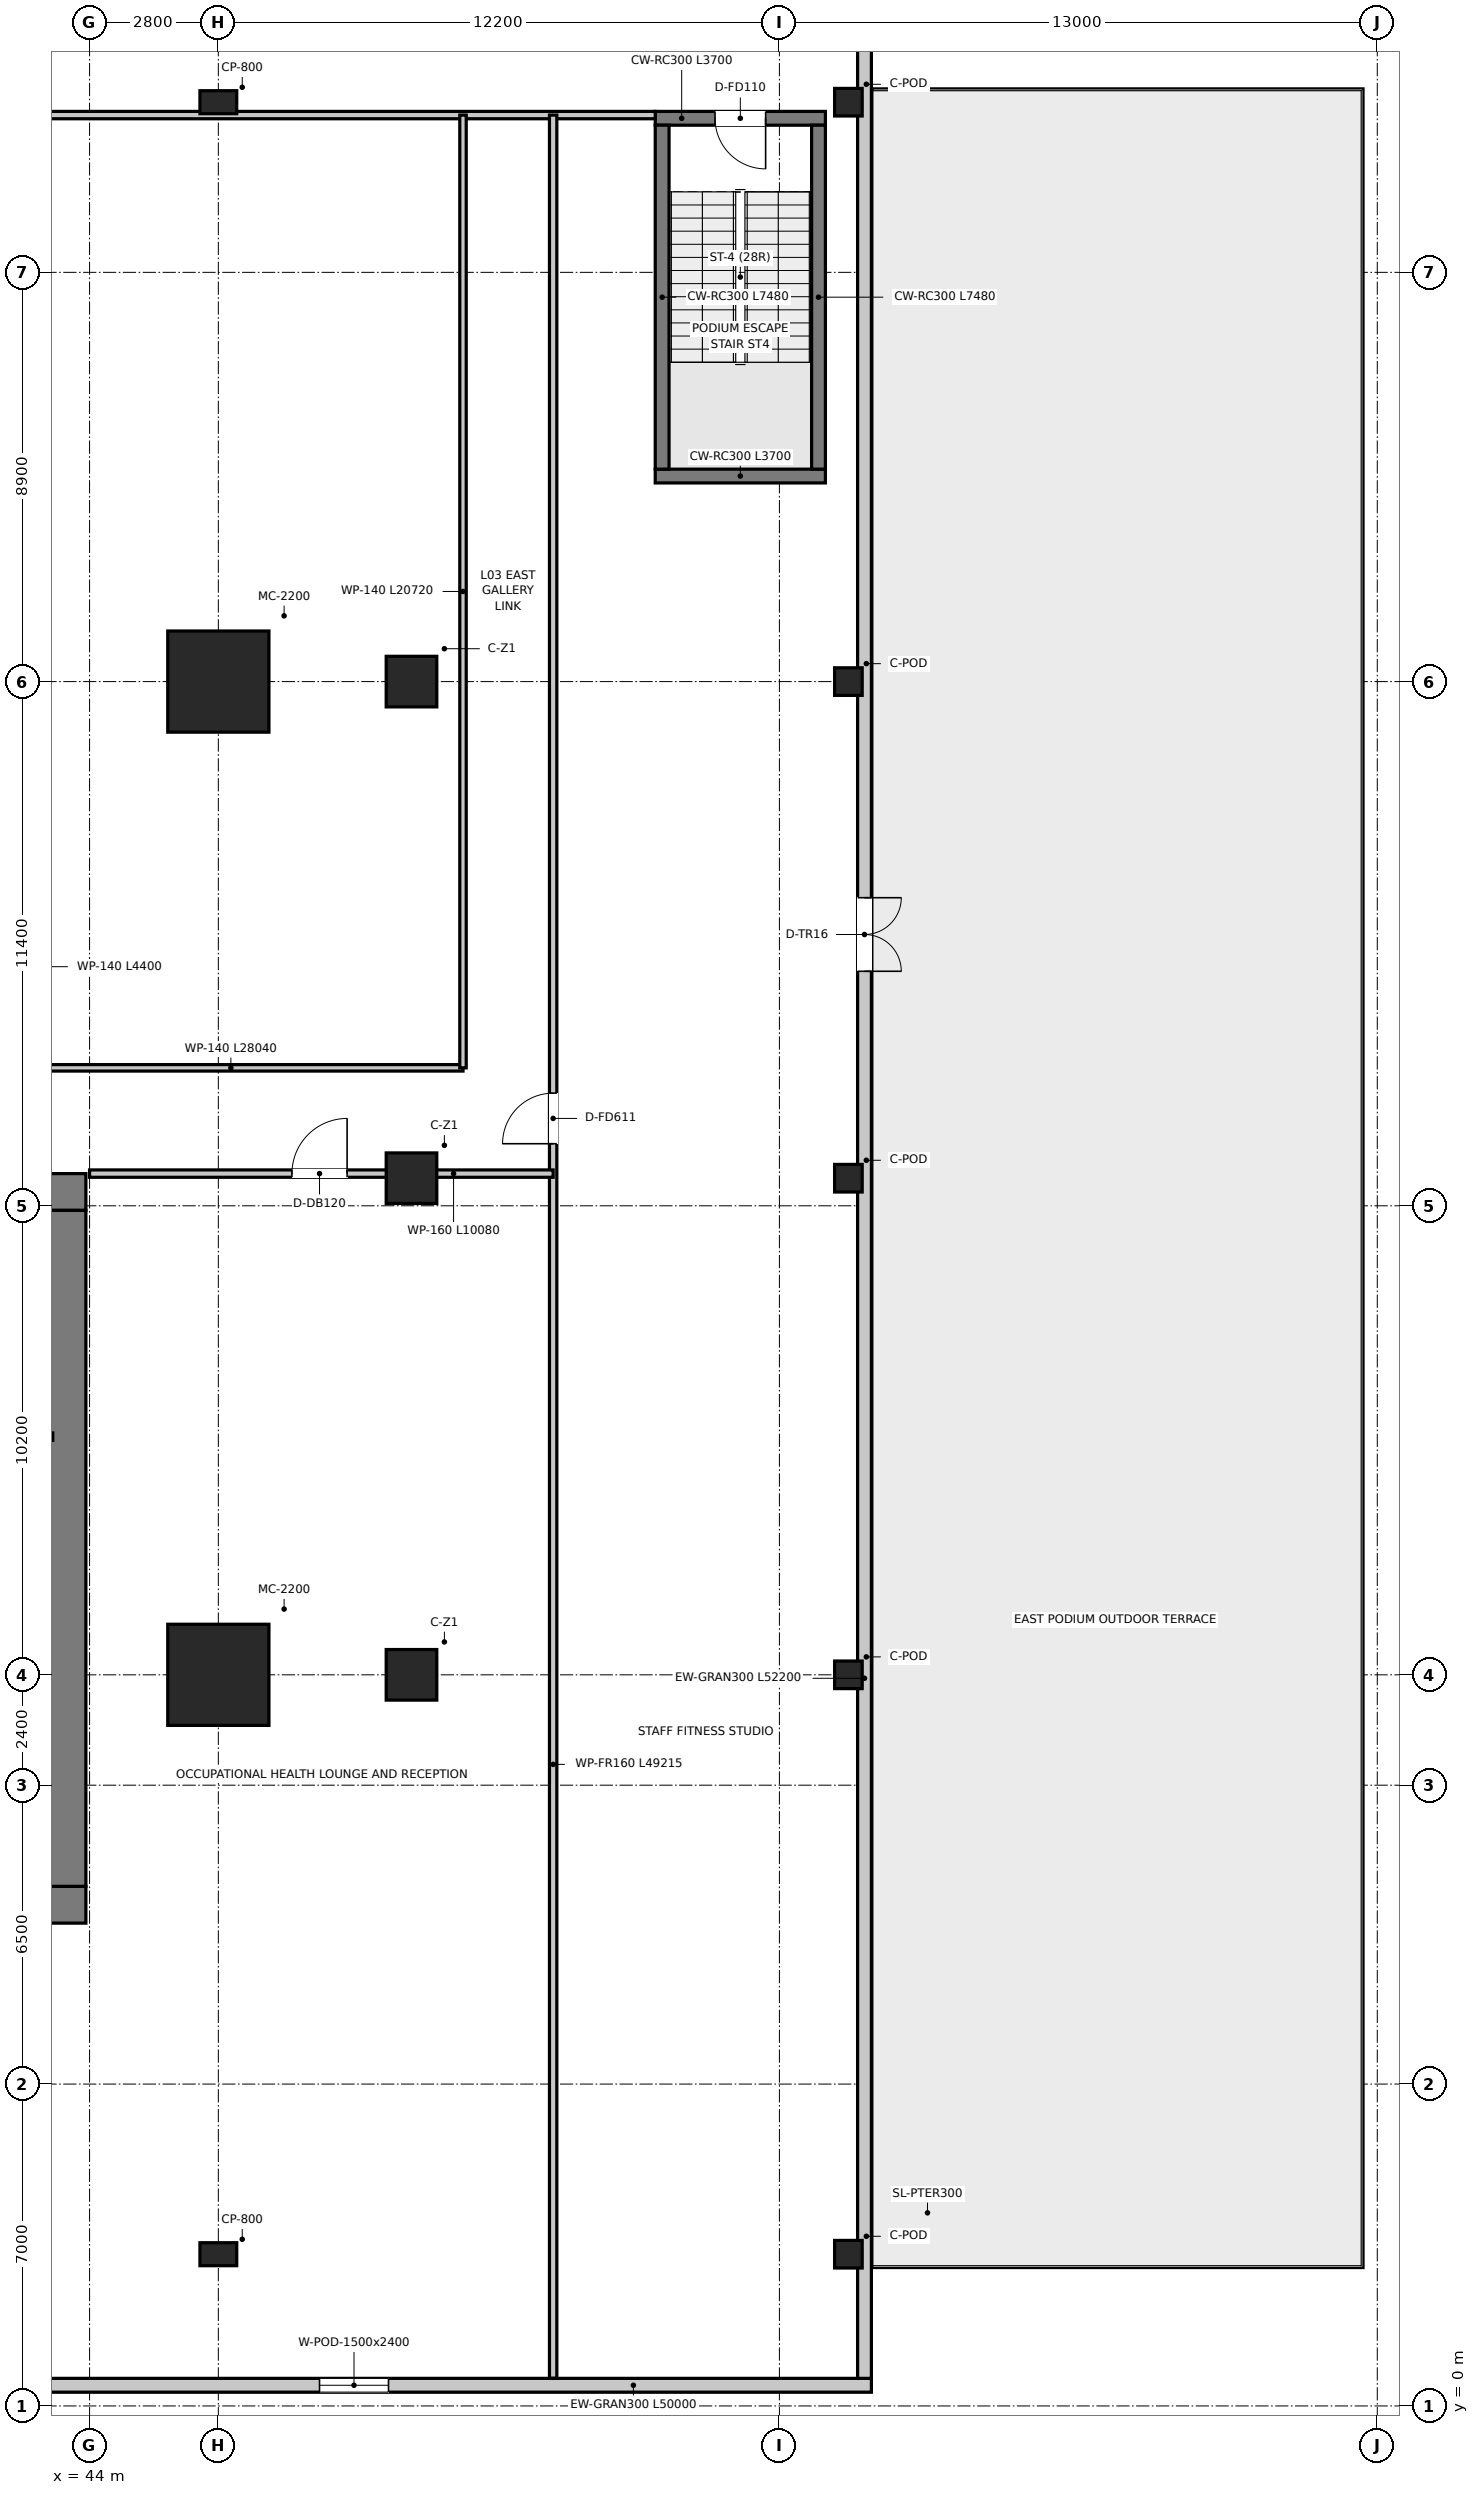
"""IFC4 building model, lengths in metres.
Left out: names, types, materials, properties, quantities, classifications, styles, units other than length and angle.
Written with IfcOpenShell. Run it as: python <this file> out.ifc"""

import sys

from ifc_helpers import new_model, si_unit, direction, frame, frame_2d, origin, origin_2d, place, context, subcontext, project, spatial, rectangle, extrude, source, transform, mapped, element, fill, save


model = new_model("IFC4")
c1 = context("Model", 3, precision=1e-05, world=origin(), true_north=direction((0.0, 1.0)))
c2 = subcontext(c1, "Body", "Model", "MODEL_VIEW")
j1 = project(units=[si_unit("LENGTHUNIT", "METRE"), si_unit("PLANEANGLEUNIT", "RADIAN")], contexts=[c1])
p1 = place(None, origin())
s1 = spatial("IfcSite", under=j1, at=p1, CompositionType="ELEMENT")
p2 = place(p1, origin())
s2 = spatial("IfcBuilding", under=s1, at=p2, CompositionType="ELEMENT")
p3 = place(p2, frame((0.0, 0.0, 15.4)))
s3 = spatial("IfcBuildingStorey", under=s2, at=p3, CompositionType="ELEMENT", Elevation=15.4)
p4 = place(p3, frame((28.08, 10.9, 0.0), z_axis=(0.0, 0.0, 1.0), x_axis=(1.0, 0.0, 0.0)))
e1 = element("IfcWall", 1, at=p4, inside=s3, PredefinedType="SHEAR", context=c2, shape_type="SweptSolid", body=[
    extrude(rectangle(XDim=15.84, YDim=0.8, at=frame_2d((7.92, 0.0))), origin(), (0.0, 0.0, 1.0), 4.6),
])
p5 = place(p3, frame((28.08, 26.4, 0.0), z_axis=(0.0, 0.0, 1.0), x_axis=(1.0, 0.0, 0.0)))
e2 = element("IfcWall", 2, at=p5, inside=s3, PredefinedType="SHEAR", context=c2, shape_type="SweptSolid", body=[
    extrude(rectangle(XDim=15.84, YDim=0.8, at=frame_2d((7.92, 0.0))), origin(), (0.0, 0.0, 1.0), 4.6),
])
p6 = place(p5, frame((7.22, 0.0, 0.0)))
e3 = element("IfcOpeningElement", 3, at=p6, cuts=e2, PredefinedType="OPENING", context=c2, shape_type="SweptSolid", body=[
    extrude(rectangle(XDim=1.4, YDim=2.2, at=frame_2d((0.7, 1.1))), frame((0.0, 0.41, 0.0), z_axis=(0.0, -1.0, 0.0), x_axis=(1.0, 0.0, 0.0)), (0.0, 0.0, 1.0), 0.82),
])
p7 = place(p5, frame((1.775, 0.0, 0.0)))
e4 = element("IfcOpeningElement", 4, at=p7, cuts=e2, PredefinedType="OPENING", context=c2, shape_type="SweptSolid", body=[
    extrude(rectangle(XDim=1.05, YDim=2.1, at=frame_2d((0.525, 1.05))), frame((0.0, 0.41, 0.0), z_axis=(0.0, -1.0, 0.0), x_axis=(1.0, 0.0, 0.0)), (0.0, 0.0, 1.0), 0.82),
])
p8 = place(p5, frame((13.015, 0.0, 0.0)))
e5 = element("IfcOpeningElement", 5, at=p8, cuts=e2, PredefinedType="OPENING", context=c2, shape_type="SweptSolid", body=[
    extrude(rectangle(XDim=1.05, YDim=2.1, at=frame_2d((0.525, 1.05))), frame((0.0, 0.41, 0.0), z_axis=(0.0, -1.0, 0.0), x_axis=(1.0, 0.0, 0.0)), (0.0, 0.0, 1.0), 0.82),
])
p9 = place(p3, frame((43.52, 11.3, 0.0), z_axis=(0.0, 0.0, 1.0), x_axis=(0.0, 1.0, 0.0)))
e6 = element("IfcWall", 6, at=p9, inside=s3, PredefinedType="SHEAR", context=c2, shape_type="SweptSolid", body=[
    extrude(rectangle(XDim=14.7, YDim=0.8, at=frame_2d((7.35, 0.0))), origin(), (0.0, 0.0, 1.0), 4.6),
])
p10 = place(p3, frame((56.3, 41.97, 0.0), z_axis=(0.0, 0.0, 1.0), x_axis=(1.0, 0.0, 0.0)))
e7 = element("IfcWall", 7, at=p10, inside=s3, PredefinedType="SHEAR", context=c2, shape_type="SweptSolid", body=[
    extrude(rectangle(XDim=3.7, YDim=0.3, at=frame_2d((1.85, 0.0))), origin(), (0.0, 0.0, 1.0), 4.6),
])
p11 = place(p3, frame((60.0, 49.75, 0.0), z_axis=(0.0, 0.0, 1.0), x_axis=(-1.0, 0.0, 0.0)))
e8 = element("IfcWall", 8, at=p11, inside=s3, PredefinedType="SHEAR", context=c2, shape_type="SweptSolid", body=[
    extrude(rectangle(XDim=3.7, YDim=0.3, at=frame_2d((1.85, 0.0))), origin(), (0.0, 0.0, 1.0), 4.6),
])
p12 = place(p11, frame((1.3, 0.0, 0.0)))
e9 = element("IfcOpeningElement", 9, at=p12, cuts=e8, PredefinedType="OPENING", context=c2, shape_type="SweptSolid", body=[
    extrude(rectangle(XDim=1.1, YDim=2.15, at=frame_2d((0.55, 1.075))), frame((0.0, 0.16, 0.0), z_axis=(0.0, -1.0, 0.0), x_axis=(1.0, 0.0, 0.0)), (0.0, 0.0, 1.0), 0.32),
])
for number, where, z_axis, x_axis in (
    (10, (56.45, 42.12, 0.0), (0.0, 0.0, 1.0), (0.0, 1.0, 0.0)),
    (11, (59.85, 42.12, 0.0), (0.0, 0.0, 1.0), (0.0, 1.0, 0.0)),
):
    element("IfcWall", number, at=place(p3, frame(where, z_axis=z_axis, x_axis=x_axis)), inside=s3, PredefinedType="SHEAR", context=c2, shape_type="SweptSolid", body=[
        extrude(rectangle(XDim=7.48, YDim=0.3, at=frame_2d((3.74, 0.0))), origin(), (0.0, 0.0, 1.0), 4.6),
    ])
m1 = source(origin(), c2, "Body", "SweptSolid", [
    extrude(rectangle(XDim=2.2, YDim=2.2, at=origin_2d()), origin(), (0.0, 0.0, 1.0), 4.6),
])
for number, where, z_axis, x_axis in (
    (12, (46.8, 15.9, 0.0), (0.0, 0.0, 1.0), (1.0, 0.0, 0.0)),
    (13, (46.8, 37.5, 0.0), (0.0, 0.0, 1.0), (1.0, 0.0, 0.0)),
):
    element("IfcColumn", number, at=place(p3, frame(where, z_axis=z_axis, x_axis=x_axis)), inside=s3, PredefinedType="USERDEFINED", context=c2, shape_type="MappedRepresentation", body=[
        mapped(m1, transform((0.0, 0.0, 0.0), x_axis=(1.0, 0.0, 0.0), y_axis=(0.0, 1.0, 0.0), z_axis=(0.0, 0.0, 1.0), scale=1.0)),
    ])
m2 = source(origin(), c2, "Body", "SweptSolid", [
    extrude(rectangle(XDim=1.1, YDim=1.1, at=origin_2d()), origin(), (0.0, 0.0, 1.0), 4.6),
])
for number, where, z_axis, x_axis in (
    (14, (51.0, 37.5, 0.0), (0.0, 0.0, 1.0), (1.0, 0.0, 0.0)),
    (15, (51.0, 26.7, 0.0), (0.0, 0.0, 1.0), (1.0, 0.0, 0.0)),
    (16, (51.0, 15.9, 0.0), (0.0, 0.0, 1.0), (1.0, 0.0, 0.0)),
):
    element("IfcColumn", number, at=place(p3, frame(where, z_axis=z_axis, x_axis=x_axis)), inside=s3, PredefinedType="COLUMN", context=c2, shape_type="MappedRepresentation", body=[
        mapped(m2, transform((0.0, 0.0, 0.0), x_axis=(1.0, 0.0, 0.0), y_axis=(0.0, 1.0, 0.0), z_axis=(0.0, 0.0, 1.0), scale=1.0)),
    ])
m3 = source(origin(), c2, "Body", "SweptSolid", [
    extrude(rectangle(XDim=0.6, YDim=0.6, at=origin_2d()), origin(), (0.0, 0.0, 1.0), 4.6),
])
for number, where, z_axis, x_axis in (
    (17, (60.5, 15.9, 0.0), (0.0, 0.0, 1.0), (1.0, 0.0, 0.0)),
    (18, (60.5, 26.7, 0.0), (0.0, 0.0, 1.0), (1.0, 0.0, 0.0)),
    (19, (60.5, 37.5, 0.0), (0.0, 0.0, 1.0), (1.0, 0.0, 0.0)),
    (20, (60.5, 50.1, 0.0), (0.0, 0.0, 1.0), (1.0, 0.0, 0.0)),
    (21, (60.5, 3.3, 0.0), (0.0, 0.0, 1.0), (1.0, 0.0, 0.0)),
):
    element("IfcColumn", number, at=place(p3, frame(where, z_axis=z_axis, x_axis=x_axis)), inside=s3, PredefinedType="COLUMN", context=c2, shape_type="MappedRepresentation", body=[
        mapped(m3, transform((0.0, 0.0, 0.0), x_axis=(1.0, 0.0, 0.0), y_axis=(0.0, 1.0, 0.0), z_axis=(0.0, 0.0, 1.0), scale=1.0)),
    ])
m4 = source(origin(), c2, "Body", "SweptSolid", [
    extrude(rectangle(XDim=0.8, YDim=0.5, at=origin_2d()), origin(), (0.0, 0.0, 1.0), 4.6),
])
for number, where, z_axis, x_axis in (
    (22, (46.8, 3.3, 0.0), (0.0, 0.0, 1.0), (1.0, 0.0, 0.0)),
    (23, (46.8, 50.1, 0.0), (0.0, 0.0, 1.0), (1.0, 0.0, 0.0)),
):
    element("IfcColumn", number, at=place(p3, frame(where, z_axis=z_axis, x_axis=x_axis)), inside=s3, PredefinedType="PILASTER", context=c2, shape_type="MappedRepresentation", body=[
        mapped(m4, transform((0.0, 0.0, 0.0), x_axis=(1.0, 0.0, 0.0), y_axis=(0.0, 1.0, 0.0), z_axis=(0.0, 0.0, 1.0), scale=1.0)),
    ])
p13 = place(p3, frame((61.0, 0.45, 0.0), z_axis=(0.0, 0.0, 1.0), x_axis=(-1.0, 0.0, 0.0)))
e24 = element("IfcWall", 24, at=p13, inside=s3, PredefinedType="SOLIDWALL", context=c2, shape_type="SweptSolid", body=[
    extrude(rectangle(XDim=50.0, YDim=0.3, at=frame_2d((25.0, 0.0))), origin(), (0.0, 0.0, 1.0), 4.25),
])
p14 = place(p13, frame((43.5, 0.0, 1.25)))
e25 = element("IfcOpeningElement", 25, at=p14, cuts=e24, PredefinedType="OPENING", context=c2, shape_type="SweptSolid", body=[
    extrude(rectangle(XDim=0.9, YDim=1.5, at=frame_2d((0.45, 0.75))), frame((0.0, 0.16, 0.0), z_axis=(0.0, -1.0, 0.0), x_axis=(1.0, 0.0, 0.0)), (0.0, 0.0, 1.0), 0.32),
])
p15 = place(p13, frame((34.5, 0.0, 1.1)))
e26 = element("IfcOpeningElement", 26, at=p15, cuts=e24, PredefinedType="OPENING", context=c2, shape_type="SweptSolid", body=[
    extrude(rectangle(XDim=2.0, YDim=1.8, at=frame_2d((1.0, 0.9))), frame((0.0, 0.16, 0.0), z_axis=(0.0, -1.0, 0.0), x_axis=(1.0, 0.0, 0.0)), (0.0, 0.0, 1.0), 0.32),
])
p16 = place(p13, frame((28.0, 0.0, 0.9)))
e27 = element("IfcOpeningElement", 27, at=p16, cuts=e24, PredefinedType="OPENING", context=c2, shape_type="SweptSolid", body=[
    extrude(rectangle(XDim=2.4, YDim=2.6, at=frame_2d((1.2, 1.3))), frame((0.0, 0.16, 0.0), z_axis=(0.0, -1.0, 0.0), x_axis=(1.0, 0.0, 0.0)), (0.0, 0.0, 1.0), 0.32),
])
p17 = place(p13, frame((20.0, 0.0, 0.9)))
e28 = element("IfcOpeningElement", 28, at=p17, cuts=e24, PredefinedType="OPENING", context=c2, shape_type="SweptSolid", body=[
    extrude(rectangle(XDim=1.8, YDim=2.6, at=frame_2d((0.9, 1.3))), frame((0.0, 0.16, 0.0), z_axis=(0.0, -1.0, 0.0), x_axis=(1.0, 0.0, 0.0)), (0.0, 0.0, 1.0), 0.32),
])
p18 = place(p13, frame((10.5, 0.0, 0.95)))
e29 = element("IfcOpeningElement", 29, at=p18, cuts=e24, PredefinedType="OPENING", context=c2, shape_type="SweptSolid", body=[
    extrude(rectangle(XDim=1.5, YDim=2.4, at=frame_2d((0.75, 1.2))), frame((0.0, 0.16, 0.0), z_axis=(0.0, -1.0, 0.0), x_axis=(1.0, 0.0, 0.0)), (0.0, 0.0, 1.0), 0.32),
])
p19 = place(p3, frame((60.85, 52.8, 0.0), z_axis=(0.0, 0.0, 1.0), x_axis=(0.0, -1.0, 0.0)))
e30 = element("IfcWall", 30, at=p19, inside=s3, PredefinedType="SOLIDWALL", context=c2, shape_type="SweptSolid", body=[
    extrude(rectangle(XDim=52.2, YDim=0.3, at=frame_2d((26.1, 0.0))), origin(), (0.0, 0.0, 1.0), 4.25),
])
p20 = place(p19, frame((20.0, 0.0, 0.0)))
e31 = element("IfcOpeningElement", 31, at=p20, cuts=e30, PredefinedType="OPENING", context=c2, shape_type="SweptSolid", body=[
    extrude(rectangle(XDim=1.6, YDim=2.15, at=frame_2d((0.8, 1.075))), frame((0.0, 0.16, 0.0), z_axis=(0.0, -1.0, 0.0), x_axis=(1.0, 0.0, 0.0)), (0.0, 0.0, 1.0), 0.32),
])
p21 = place(p3, frame((40.04, 21.08, 0.0), z_axis=(0.0, 0.0, 1.0), x_axis=(1.0, 0.0, 0.0)))
e32 = element("IfcWall", 32, at=p21, inside=s3, PredefinedType="PARTITIONING", context=c2, shape_type="SweptSolid", body=[
    extrude(rectangle(XDim=3.16, YDim=0.16, at=frame_2d((1.58, 0.0))), origin(), (0.0, 0.0, 1.0), 4.25),
])
p22 = place(p21, frame((1.055, 0.0, 0.0)))
e33 = element("IfcOpeningElement", 33, at=p22, cuts=e32, PredefinedType="OPENING", context=c2, shape_type="SweptSolid", body=[
    extrude(rectangle(XDim=1.05, YDim=2.1, at=frame_2d((0.525, 1.05))), frame((0.0, 0.09, 0.0), z_axis=(0.0, -1.0, 0.0), x_axis=(1.0, 0.0, 0.0)), (0.0, 0.0, 1.0), 0.18),
])
p23 = place(p3, frame((24.08, 29.1, 0.0), z_axis=(0.0, 0.0, 1.0), x_axis=(1.0, 0.0, 0.0)))
e34 = element("IfcWall", 34, at=p23, inside=s3, PredefinedType="PARTITIONING", context=c2, shape_type="SweptSolid", body=[
    extrude(rectangle(XDim=28.04, YDim=0.14, at=frame_2d((14.02, 0.0))), origin(), (0.0, 0.0, 1.0), 3.45),
])
p24 = place(p23, frame((8.745, 0.0, 0.0)))
e35 = element("IfcOpeningElement", 35, at=p24, cuts=e34, PredefinedType="OPENING", context=c2, shape_type="SweptSolid", body=[
    extrude(rectangle(XDim=0.95, YDim=2.1, at=frame_2d((0.475, 1.05))), frame((0.0, 0.08, 0.0), z_axis=(0.0, -1.0, 0.0), x_axis=(1.0, 0.0, 0.0)), (0.0, 0.0, 1.0), 0.16),
])
p25 = place(p23, frame((13.145, 0.0, 0.0)))
e36 = element("IfcOpeningElement", 36, at=p25, cuts=e34, PredefinedType="OPENING", context=c2, shape_type="SweptSolid", body=[
    extrude(rectangle(XDim=0.95, YDim=2.1, at=frame_2d((0.475, 1.05))), frame((0.0, 0.08, 0.0), z_axis=(0.0, -1.0, 0.0), x_axis=(1.0, 0.0, 0.0)), (0.0, 0.0, 1.0), 0.16),
])
p26 = place(p23, frame((16.845, 0.0, 0.0)))
e37 = element("IfcOpeningElement", 37, at=p26, cuts=e34, PredefinedType="OPENING", context=c2, shape_type="SweptSolid", body=[
    extrude(rectangle(XDim=0.95, YDim=2.1, at=frame_2d((0.475, 1.05))), frame((0.0, 0.08, 0.0), z_axis=(0.0, -1.0, 0.0), x_axis=(1.0, 0.0, 0.0)), (0.0, 0.0, 1.0), 0.16),
])
p27 = place(p3, frame((15.6, 49.82, 0.0), z_axis=(0.0, 0.0, 1.0), x_axis=(1.0, 0.0, 0.0)))
e38 = element("IfcWall", 38, at=p27, inside=s3, PredefinedType="PARTITIONING", context=c2, shape_type="SweptSolid", body=[
    extrude(rectangle(XDim=40.7, YDim=0.16, at=frame_2d((20.35, 0.0))), origin(), (0.0, 0.0, 1.0), 3.56),
])
p28 = place(p3, frame((52.12, 29.1, 0.0), z_axis=(0.0, 0.0, 1.0), x_axis=(0.0, 1.0, 0.0)))
e39 = element("IfcWall", 39, at=p28, inside=s3, PredefinedType="PARTITIONING", context=c2, shape_type="SweptSolid", body=[
    extrude(rectangle(XDim=20.72, YDim=0.14, at=frame_2d((10.36, 0.0))), origin(), (0.0, 0.0, 1.0), 3.61),
])
p29 = place(p3, frame((54.08, 0.605, 0.0), z_axis=(0.0, 0.0, 1.0), x_axis=(0.0, 1.0, 0.0)))
e40 = element("IfcWall", 40, at=p29, inside=s3, PredefinedType="PARTITIONING", context=c2, shape_type="SweptSolid", body=[
    extrude(rectangle(XDim=49.215, YDim=0.16, at=frame_2d((24.607, 0.0))), origin(), (0.0, 0.0, 1.0), 3.61),
])
p30 = place(p29, frame((26.845, 0.0, 0.0)))
e41 = element("IfcOpeningElement", 41, at=p30, cuts=e40, PredefinedType="OPENING", context=c2, shape_type="SweptSolid", body=[
    extrude(rectangle(XDim=1.1, YDim=2.15, at=frame_2d((0.55, 1.075))), frame((0.0, 0.09, 0.0), z_axis=(0.0, -1.0, 0.0), x_axis=(1.0, 0.0, 0.0)), (0.0, 0.0, 1.0), 0.18),
])
p31 = place(p3, frame((44.0, 26.8, 0.0), z_axis=(0.0, 0.0, 1.0), x_axis=(1.0, 0.0, 0.0)))
e42 = element("IfcWall", 42, at=p31, inside=s3, PredefinedType="PARTITIONING", context=c2, shape_type="SweptSolid", body=[
    extrude(rectangle(XDim=10.08, YDim=0.16, at=frame_2d((5.04, 0.0))), origin(), (0.0, 0.0, 1.0), 3.45),
])
p32 = place(p31, frame((4.4, 0.0, 0.0)))
e43 = element("IfcOpeningElement", 43, at=p32, cuts=e42, PredefinedType="OPENING", context=c2, shape_type="SweptSolid", body=[
    extrude(rectangle(XDim=1.2, YDim=2.15, at=frame_2d((0.6, 1.075))), frame((0.0, 0.09, 0.0), z_axis=(0.0, -1.0, 0.0), x_axis=(1.0, 0.0, 0.0)), (0.0, 0.0, 1.0), 0.18),
])
p33 = place(p18, origin())
e44 = element("IfcWindow", 44, at=p33, inside=s3, PartitioningType="SINGLE_PANEL", PredefinedType="WINDOW", context=c2, shape_type="SweptSolid", body=[
    extrude(rectangle(XDim=1.5, YDim=2.4, at=frame_2d((0.75, 1.2))), frame((0.0, 0.03, 0.0), z_axis=(0.0, -1.0, 0.0), x_axis=(1.0, 0.0, 0.0)), (0.0, 0.0, 1.0), 0.06),
])
fill(e29, e44)
p34 = place(p20, origin())
e45 = element("IfcDoor", 45, at=p34, inside=s3, OperationType="DOUBLE_DOOR_SINGLE_SWING", PredefinedType="DOOR", context=c2, shape_type="SweptSolid", body=[
    extrude(rectangle(XDim=1.6, YDim=2.15, at=frame_2d((0.8, 1.075))), frame((0.0, 0.025, 0.0), z_axis=(0.0, -1.0, 0.0), x_axis=(1.0, 0.0, 0.0)), (0.0, 0.0, 1.0), 0.05),
])
fill(e31, e45)
p35 = place(p12, origin())
e46 = element("IfcDoor", 46, at=p35, inside=s3, OperationType="SINGLE_SWING_LEFT", PredefinedType="DOOR", context=c2, shape_type="SweptSolid", body=[
    extrude(rectangle(XDim=1.1, YDim=2.15, at=frame_2d((0.55, 1.075))), frame((0.0, 0.025, 0.0), z_axis=(0.0, -1.0, 0.0), x_axis=(1.0, 0.0, 0.0)), (0.0, 0.0, 1.0), 0.05),
])
fill(e9, e46)
p36 = place(p32, origin())
e47 = element("IfcDoor", 47, at=p36, inside=s3, OperationType="SINGLE_SWING_RIGHT", PredefinedType="DOOR", context=c2, shape_type="SweptSolid", body=[
    extrude(rectangle(XDim=1.2, YDim=2.15, at=frame_2d((0.6, 1.075))), frame((0.0, 0.025, 0.0), z_axis=(0.0, -1.0, 0.0), x_axis=(1.0, 0.0, 0.0)), (0.0, 0.0, 1.0), 0.05),
])
fill(e43, e47)
p37 = place(p30, origin())
e48 = element("IfcDoor", 48, at=p37, inside=s3, OperationType="SINGLE_SWING_LEFT", PredefinedType="DOOR", context=c2, shape_type="SweptSolid", body=[
    extrude(rectangle(XDim=1.1, YDim=2.15, at=frame_2d((0.55, 1.075))), frame((0.0, 0.025, 0.0), z_axis=(0.0, -1.0, 0.0), x_axis=(1.0, 0.0, 0.0)), (0.0, 0.0, 1.0), 0.05),
])
fill(e41, e48)
save(model, sys.argv[1])
